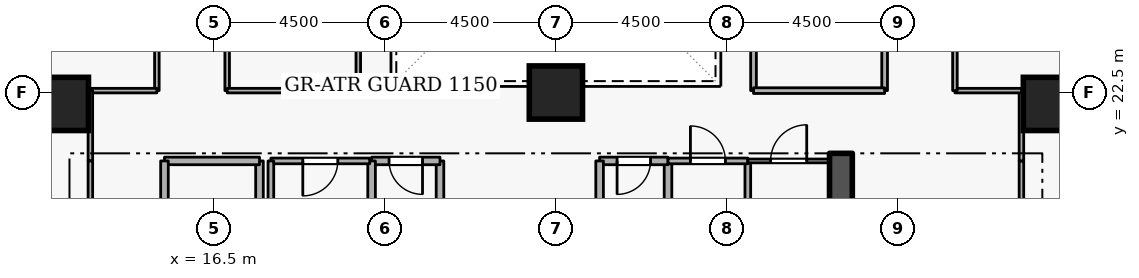
"""IFC4 building model, lengths in metres.
Left out: names, types, materials, properties, quantities, classifications, styles, units other than length and angle.
Written with IfcOpenShell. Run it as: python <this file> out.ifc"""

import sys

from ifc_helpers import new_model, si_unit, direction, frame, frame_2d, origin, origin_2d, place, context, subcontext, project, spatial, rectangle, extrude, element, fill, save


model = new_model("IFC4")
c1 = context("Model", 3, precision=1e-05, world=origin(), true_north=direction((0.0, 1.0)))
c2 = subcontext(c1, "Body", "Model", "MODEL_VIEW")
j1 = project(units=[si_unit("LENGTHUNIT", "METRE"), si_unit("PLANEANGLEUNIT", "RADIAN")], contexts=[c1])
p1 = place(None, origin())
s1 = spatial("IfcSite", under=j1, at=p1, CompositionType="ELEMENT")
p2 = place(p1, origin())
s2 = spatial("IfcBuilding", under=s1, at=p2, CompositionType="ELEMENT")
p3 = place(p2, frame((0.0, 0.0, 64.5)))
s3 = spatial("IfcBuildingStorey", under=s2, at=p3, CompositionType="ELEMENT", Elevation=64.5)
p4 = place(p3, frame((33.0, 15.2, 0.0), z_axis=(0.0, 0.0, 1.0), x_axis=(0.0, 1.0, 0.0)))
e1 = element("IfcWall", 1, at=p4, inside=s3, PredefinedType="SHEAR", context=c2, shape_type="SweptSolid", body=[
    extrude(rectangle(XDim=5.7, YDim=0.6, at=frame_2d((2.85, 0.0))), origin(), (0.0, 0.0, 1.0), 3.6),
])
for number, where, z_axis, x_axis in (
    (2, (12.5, 22.2, 0.0), (0.0, 0.0, 1.0), (1.0, 0.0, 0.0)),
    (3, (38.5, 22.2, 0.0), (0.0, 0.0, 1.0), (1.0, 0.0, 0.0)),
    (4, (25.5, 22.5, 0.0), (0.0, 0.0, 1.0), (1.0, 0.0, 0.0)),
):
    element("IfcColumn", number, at=place(p3, frame(where, z_axis=z_axis, x_axis=x_axis)), inside=s3, PredefinedType="COLUMN", context=c2, shape_type="SweptSolid", body=[
        extrude(rectangle(XDim=1.4, YDim=1.4, at=origin_2d()), origin(), (0.0, 0.0, 1.0), 3.6),
    ])
p5 = place(p3, frame((17.7, 18.4, 0.0), z_axis=(0.0, 0.0, 1.0), x_axis=(0.0, 1.0, 0.0)))
e5 = element("IfcWall", 5, at=p5, inside=s3, PredefinedType="STANDARD", context=c2, shape_type="SweptSolid", body=[
    extrude(rectangle(XDim=2.3, YDim=0.2, at=frame_2d((1.15, 0.0))), origin(), (0.0, 0.0, 1.0), 2.545),
])
p6 = place(p3, frame((17.7, 20.7, 0.0), z_axis=(0.0, 0.0, 1.0), x_axis=(-1.0, 0.0, 0.0)))
e6 = element("IfcWall", 6, at=p6, inside=s3, PredefinedType="STANDARD", context=c2, shape_type="SweptSolid", body=[
    extrude(rectangle(XDim=2.5, YDim=0.2, at=frame_2d((1.25, 0.0))), origin(), (0.0, 0.0, 1.0), 3.34),
])
p7 = place(p3, frame((15.2, 20.7, 0.0), z_axis=(0.0, 0.0, 1.0), x_axis=(0.0, -1.0, 0.0)))
e7 = element("IfcWall", 7, at=p7, inside=s3, PredefinedType="STANDARD", context=c2, shape_type="SweptSolid", body=[
    extrude(rectangle(XDim=5.7, YDim=0.2, at=frame_2d((2.85, 0.0))), origin(), (0.0, 0.0, 1.0), 3.34),
])
p8 = place(p7, frame((2.275, 0.0, 0.0)))
e8 = element("IfcOpeningElement", 8, at=p8, cuts=e7, PredefinedType="OPENING", context=c2, shape_type="SweptSolid", body=[
    extrude(rectangle(XDim=1.15, YDim=2.1, at=frame_2d((0.575, 1.05))), frame((0.0, 0.11, 0.0), z_axis=(0.0, -1.0, 0.0), x_axis=(1.0, 0.0, 0.0)), (0.0, 0.0, 1.0), 0.22),
])
p9 = place(p3, frame((28.45, 18.65, 0.0), z_axis=(0.0, 0.0, 1.0), x_axis=(0.0, 1.0, 0.0)))
e9 = element("IfcWall", 9, at=p9, inside=s3, PredefinedType="STANDARD", context=c2, shape_type="SweptSolid", body=[
    extrude(rectangle(XDim=2.05, YDim=0.2, at=frame_2d((1.025, 0.0))), origin(), (0.0, 0.0, 1.0), 3.34),
])
p10 = place(p3, frame((28.45, 20.7, 0.0), z_axis=(0.0, 0.0, 1.0), x_axis=(-1.0, 0.0, 0.0)))
e10 = element("IfcWall", 10, at=p10, inside=s3, PredefinedType="STANDARD", context=c2, shape_type="SweptSolid", body=[
    extrude(rectangle(XDim=1.8, YDim=0.2, at=frame_2d((0.9, 0.0))), origin(), (0.0, 0.0, 1.0), 3.34),
])
p11 = place(p10, frame((0.46, 0.0, 0.0)))
e11 = element("IfcOpeningElement", 11, at=p11, cuts=e10, PredefinedType="OPENING", context=c2, shape_type="SweptSolid", body=[
    extrude(rectangle(XDim=0.88, YDim=2.04, at=frame_2d((0.44, 1.02))), frame((0.0, 0.11, 0.0), z_axis=(0.0, -1.0, 0.0), x_axis=(1.0, 0.0, 0.0)), (0.0, 0.0, 1.0), 0.22),
])
for number, where, z_axis, x_axis in (
    (12, (26.65, 20.7, 0.0), (0.0, 0.0, 1.0), (0.0, -1.0, 0.0)),
    (13, (22.45, 18.65, 0.0), (0.0, 0.0, 1.0), (0.0, 1.0, 0.0)),
):
    element("IfcWall", number, at=place(p3, frame(where, z_axis=z_axis, x_axis=x_axis)), inside=s3, PredefinedType="STANDARD", context=c2, shape_type="SweptSolid", body=[
        extrude(rectangle(XDim=2.05, YDim=0.2, at=frame_2d((1.025, 0.0))), origin(), (0.0, 0.0, 1.0), 3.34),
    ])
p12 = place(p3, frame((22.45, 20.7, 0.0), z_axis=(0.0, 0.0, 1.0), x_axis=(-1.0, 0.0, 0.0)))
e14 = element("IfcWall", 14, at=p12, inside=s3, PredefinedType="STANDARD", context=c2, shape_type="SweptSolid", body=[
    extrude(rectangle(XDim=1.8, YDim=0.2, at=frame_2d((0.9, 0.0))), origin(), (0.0, 0.0, 1.0), 3.34),
])
p13 = place(p12, frame((0.46, 0.0, 0.0)))
e15 = element("IfcOpeningElement", 15, at=p13, cuts=e14, PredefinedType="OPENING", context=c2, shape_type="SweptSolid", body=[
    extrude(rectangle(XDim=0.88, YDim=2.04, at=frame_2d((0.44, 1.02))), frame((0.0, 0.11, 0.0), z_axis=(0.0, -1.0, 0.0), x_axis=(1.0, 0.0, 0.0)), (0.0, 0.0, 1.0), 0.22),
])
p14 = place(p3, frame((20.65, 20.7, 0.0), z_axis=(0.0, 0.0, 1.0), x_axis=(0.0, -1.0, 0.0)))
e16 = element("IfcWall", 16, at=p14, inside=s3, PredefinedType="STANDARD", context=c2, shape_type="SweptSolid", body=[
    extrude(rectangle(XDim=2.05, YDim=0.2, at=frame_2d((1.025, 0.0))), origin(), (0.0, 0.0, 1.0), 3.34),
])
p15 = place(p3, frame((20.6, 20.7, 0.0), z_axis=(0.0, 0.0, 1.0), x_axis=(-1.0, 0.0, 0.0)))
e17 = element("IfcWall", 17, at=p15, inside=s3, PredefinedType="PARTITIONING", context=c2, shape_type="SweptSolid", body=[
    extrude(rectangle(XDim=2.6, YDim=0.15, at=frame_2d((1.3, 0.0))), origin(), (0.0, 0.0, 1.0), 3.34),
])
p16 = place(p15, frame((0.84, 0.0, 0.0)))
e18 = element("IfcOpeningElement", 18, at=p16, cuts=e17, PredefinedType="OPENING", context=c2, shape_type="SweptSolid", body=[
    extrude(rectangle(XDim=0.92, YDim=2.08, at=frame_2d((0.46, 1.04))), frame((0.0, 0.085, 0.0), z_axis=(0.0, -1.0, 0.0), x_axis=(1.0, 0.0, 0.0)), (0.0, 0.0, 1.0), 0.17),
])
p17 = place(p3, frame((18.0, 20.7, 0.0), z_axis=(0.0, 0.0, 1.0), x_axis=(0.0, -1.0, 0.0)))
e19 = element("IfcWall", 19, at=p17, inside=s3, PredefinedType="PARTITIONING", context=c2, shape_type="SweptSolid", body=[
    extrude(rectangle(XDim=2.05, YDim=0.15, at=frame_2d((1.025, 0.0))), origin(), (0.0, 0.0, 1.0), 2.545),
])
p18 = place(p3, frame((30.55, 20.7, 0.0), z_axis=(0.0, 0.0, 1.0), x_axis=(0.0, -1.0, 0.0)))
e20 = element("IfcWall", 20, at=p18, inside=s3, PredefinedType="PARTITIONING", context=c2, shape_type="SweptSolid", body=[
    extrude(rectangle(XDim=2.05, YDim=0.15, at=frame_2d((1.025, 0.0))), origin(), (0.0, 0.0, 1.0), 3.34),
])
p19 = place(p3, frame((28.45, 20.7, 0.0), z_axis=(0.0, 0.0, 1.0), x_axis=(1.0, 0.0, 0.0)))
e21 = element("IfcWall", 21, at=p19, inside=s3, PredefinedType="PARTITIONING", context=c2, shape_type="SweptSolid", body=[
    extrude(rectangle(XDim=2.1, YDim=0.15, at=frame_2d((1.05, 0.0))), origin(), (0.0, 0.0, 1.0), 3.34),
])
p20 = place(p19, frame((0.59, 0.0, 0.0)))
e22 = element("IfcOpeningElement", 22, at=p20, cuts=e21, PredefinedType="OPENING", context=c2, shape_type="SweptSolid", body=[
    extrude(rectangle(XDim=0.92, YDim=2.08, at=frame_2d((0.46, 1.04))), frame((0.0, 0.085, 0.0), z_axis=(0.0, -1.0, 0.0), x_axis=(1.0, 0.0, 0.0)), (0.0, 0.0, 1.0), 0.17),
])
p21 = place(p3, frame((30.55, 20.7, 0.0), z_axis=(0.0, 0.0, 1.0), x_axis=(1.0, 0.0, 0.0)))
e23 = element("IfcWall", 23, at=p21, inside=s3, PredefinedType="PARTITIONING", context=c2, shape_type="SweptSolid", body=[
    extrude(rectangle(XDim=2.15, YDim=0.1, at=frame_2d((1.075, 0.0))), origin(), (0.0, 0.0, 1.0), 3.34),
])
p22 = place(p21, frame((0.6, 0.0, 0.0)))
e24 = element("IfcOpeningElement", 24, at=p22, cuts=e23, PredefinedType="OPENING", context=c2, shape_type="SweptSolid", body=[
    extrude(rectangle(XDim=0.95, YDim=2.1, at=frame_2d((0.475, 1.05))), frame((0.0, 0.06, 0.0), z_axis=(0.0, -1.0, 0.0), x_axis=(1.0, 0.0, 0.0)), (0.0, 0.0, 1.0), 0.12),
])
p23 = place(p3, frame((15.0, 27.0, 0.0), z_axis=(0.0, 0.0, 1.0), x_axis=(0.0, -1.0, 0.0)))
e25 = element("IfcWall", 25, at=p23, inside=s3, PredefinedType="PARTITIONING", context=c2, shape_type="SweptSolid", body=[
    extrude(rectangle(XDim=4.45, YDim=0.12, at=frame_2d((2.225, 0.0))), origin(), (0.0, 0.0, 1.0), 3.34),
])
p24 = place(p3, frame((15.0, 22.55, 0.0), z_axis=(0.0, 0.0, 1.0), x_axis=(-1.0, 0.0, 0.0)))
e26 = element("IfcWall", 26, at=p24, inside=s3, PredefinedType="PARTITIONING", context=c2, shape_type="SweptSolid", body=[
    extrude(rectangle(XDim=1.75, YDim=0.12, at=frame_2d((0.875, 0.0))), origin(), (0.0, 0.0, 1.0), 3.34),
])
p25 = place(p3, frame((13.25, 22.55, 0.0), z_axis=(0.0, 0.0, 1.0), x_axis=(0.0, -1.0, 0.0)))
e27 = element("IfcWall", 27, at=p25, inside=s3, PredefinedType="PARTITIONING", context=c2, shape_type="SweptSolid", body=[
    extrude(rectangle(XDim=1.85, YDim=0.12, at=frame_2d((0.925, 0.0))), origin(), (0.0, 0.0, 1.0), 3.34),
])
p26 = place(p3, frame((13.25, 20.7, 0.0), z_axis=(0.0, 0.0, 1.0), x_axis=(0.0, -1.0, 0.0)))
e28 = element("IfcWall", 28, at=p26, inside=s3, PredefinedType="PARTITIONING", context=c2, shape_type="SweptSolid", body=[
    extrude(rectangle(XDim=9.35, YDim=0.12, at=frame_2d((4.675, 0.0))), origin(), (0.0, 0.0, 1.0), 3.34),
])
p27 = place(p26, frame((4.15, 0.0, 0.0)))
e29 = element("IfcOpeningElement", 29, at=p27, cuts=e28, PredefinedType="OPENING", context=c2, shape_type="SweptSolid", body=[
    extrude(rectangle(XDim=1.05, YDim=2.1, at=frame_2d((0.525, 1.05))), frame((0.0, 0.07, 0.0), z_axis=(0.0, -1.0, 0.0), x_axis=(1.0, 0.0, 0.0)), (0.0, 0.0, 1.0), 0.14),
])
p28 = place(p3, frame((37.75, 17.55, 0.0), z_axis=(0.0, 0.0, 1.0), x_axis=(0.0, 1.0, 0.0)))
e30 = element("IfcWall", 30, at=p28, inside=s3, PredefinedType="PARTITIONING", context=c2, shape_type="SweptSolid", body=[
    extrude(rectangle(XDim=3.15, YDim=0.12, at=frame_2d((1.575, 0.0))), origin(), (0.0, 0.0, 1.0), 3.34),
])
p29 = place(p3, frame((37.75, 20.7, 0.0), z_axis=(0.0, 0.0, 1.0), x_axis=(0.0, 1.0, 0.0)))
e31 = element("IfcWall", 31, at=p29, inside=s3, PredefinedType="PARTITIONING", context=c2, shape_type="SweptSolid", body=[
    extrude(rectangle(XDim=1.85, YDim=0.12, at=frame_2d((0.925, 0.0))), origin(), (0.0, 0.0, 1.0), 3.34),
])
p30 = place(p3, frame((37.75, 22.55, 0.0), z_axis=(0.0, 0.0, 1.0), x_axis=(-1.0, 0.0, 0.0)))
e32 = element("IfcWall", 32, at=p30, inside=s3, PredefinedType="PARTITIONING", context=c2, shape_type="SweptSolid", body=[
    extrude(rectangle(XDim=1.75, YDim=0.12, at=frame_2d((0.875, 0.0))), origin(), (0.0, 0.0, 1.0), 3.34),
])
p31 = place(p3, frame((36.0, 22.55, 0.0), z_axis=(0.0, 0.0, 1.0), x_axis=(0.0, 1.0, 0.0)))
e33 = element("IfcWall", 33, at=p31, inside=s3, PredefinedType="PARTITIONING", context=c2, shape_type="SweptSolid", body=[
    extrude(rectangle(XDim=4.45, YDim=0.12, at=frame_2d((2.225, 0.0))), origin(), (0.0, 0.0, 1.0), 3.34),
])
p32 = place(p31, frame((1.7, 0.0, 0.0)))
e34 = element("IfcOpeningElement", 34, at=p32, cuts=e33, PredefinedType="OPENING", context=c2, shape_type="SweptSolid", body=[
    extrude(rectangle(XDim=1.05, YDim=2.1, at=frame_2d((0.525, 1.05))), frame((0.0, 0.07, 0.0), z_axis=(0.0, -1.0, 0.0), x_axis=(1.0, 0.0, 0.0)), (0.0, 0.0, 1.0), 0.14),
])
p33 = place(p3, frame((30.7, 22.55, 0.0), z_axis=(0.0, 0.0, 1.0), x_axis=(0.0, 1.0, 0.0)))
e35 = element("IfcWall", 35, at=p33, inside=s3, PredefinedType="PARTITIONING", context=c2, shape_type="SweptSolid", body=[
    extrude(rectangle(XDim=8.9, YDim=0.15, at=frame_2d((4.45, 0.0))), origin(), (0.0, 0.0, 1.0), 3.34),
])
p34 = place(p3, frame((34.15, 31.45, 0.0), z_axis=(0.0, 0.0, 1.0), x_axis=(0.0, -1.0, 0.0)))
e36 = element("IfcWall", 36, at=p34, inside=s3, PredefinedType="PARTITIONING", context=c2, shape_type="SweptSolid", body=[
    extrude(rectangle(XDim=8.9, YDim=0.15, at=frame_2d((4.45, 0.0))), origin(), (0.0, 0.0, 1.0), 3.34),
])
p35 = place(p34, frame((3.8, 0.0, 0.0)))
e37 = element("IfcOpeningElement", 37, at=p35, cuts=e36, PredefinedType="OPENING", context=c2, shape_type="SweptSolid", body=[
    extrude(rectangle(XDim=1.3, YDim=2.12, at=frame_2d((0.65, 1.06))), frame((0.0, 0.085, 0.0), z_axis=(0.0, -1.0, 0.0), x_axis=(1.0, 0.0, 0.0)), (0.0, 0.0, 1.0), 0.17),
])
p36 = place(p3, frame((34.15, 22.55, 0.0), z_axis=(0.0, 0.0, 1.0), x_axis=(-1.0, 0.0, 0.0)))
e38 = element("IfcWall", 38, at=p36, inside=s3, PredefinedType="PARTITIONING", context=c2, shape_type="SweptSolid", body=[
    extrude(rectangle(XDim=3.45, YDim=0.15, at=frame_2d((1.725, 0.0))), origin(), (0.0, 0.0, 1.0), 3.34),
])
p37 = place(p3, frame((16.85, 22.55, 0.0), z_axis=(0.0, 0.0, 1.0), x_axis=(0.0, 1.0, 0.0)))
e39 = element("IfcWall", 39, at=p37, inside=s3, PredefinedType="PARTITIONING", context=c2, shape_type="SweptSolid", body=[
    extrude(rectangle(XDim=8.9, YDim=0.12, at=frame_2d((4.45, 0.0))), origin(), (0.0, 0.0, 1.0), 3.34),
])
p38 = place(p37, frame((3.975, 0.0, 0.0)))
e40 = element("IfcOpeningElement", 40, at=p38, cuts=e39, PredefinedType="OPENING", context=c2, shape_type="SweptSolid", body=[
    extrude(rectangle(XDim=0.95, YDim=2.1, at=frame_2d((0.475, 1.05))), frame((0.0, 0.07, 0.0), z_axis=(0.0, -1.0, 0.0), x_axis=(1.0, 0.0, 0.0)), (0.0, 0.0, 1.0), 0.14),
])
p39 = place(p3, frame((20.3, 31.45, 0.0), z_axis=(0.0, 0.0, 1.0), x_axis=(0.0, -1.0, 0.0)))
e41 = element("IfcWall", 41, at=p39, inside=s3, PredefinedType="PARTITIONING", context=c2, shape_type="SweptSolid", body=[
    extrude(rectangle(XDim=8.9, YDim=0.12, at=frame_2d((4.45, 0.0))), origin(), (0.0, 0.0, 1.0), 3.34),
])
p40 = place(p3, frame((20.3, 22.55, 0.0), z_axis=(0.0, 0.0, 1.0), x_axis=(-1.0, 0.0, 0.0)))
e42 = element("IfcWall", 42, at=p40, inside=s3, PredefinedType="PARTITIONING", context=c2, shape_type="SweptSolid", body=[
    extrude(rectangle(XDim=3.45, YDim=0.12, at=frame_2d((1.725, 0.0))), origin(), (0.0, 0.0, 1.0), 3.34),
])
p41 = place(p11, origin())
e43 = element("IfcDoor", 43, at=p41, inside=s3, OperationType="SINGLE_SWING_RIGHT", PredefinedType="DOOR", context=c2, shape_type="SweptSolid", body=[
    extrude(rectangle(XDim=0.88, YDim=2.04, at=frame_2d((0.44, 1.02))), frame((0.0, 0.025, 0.0), z_axis=(0.0, -1.0, 0.0), x_axis=(1.0, 0.0, 0.0)), (0.0, 0.0, 1.0), 0.05),
])
fill(e11, e43)
p42 = place(p13, origin())
e44 = element("IfcDoor", 44, at=p42, inside=s3, OperationType="SINGLE_SWING_LEFT", PredefinedType="DOOR", context=c2, shape_type="SweptSolid", body=[
    extrude(rectangle(XDim=0.88, YDim=2.04, at=frame_2d((0.44, 1.02))), frame((0.0, 0.025, 0.0), z_axis=(0.0, -1.0, 0.0), x_axis=(1.0, 0.0, 0.0)), (0.0, 0.0, 1.0), 0.05),
])
fill(e15, e44)
p43 = place(p16, origin())
e45 = element("IfcDoor", 45, at=p43, inside=s3, OperationType="SINGLE_SWING_RIGHT", PredefinedType="DOOR", context=c2, shape_type="SweptSolid", body=[
    extrude(rectangle(XDim=0.92, YDim=2.08, at=frame_2d((0.46, 1.04))), frame((0.0, 0.025, 0.0), z_axis=(0.0, -1.0, 0.0), x_axis=(1.0, 0.0, 0.0)), (0.0, 0.0, 1.0), 0.05),
])
fill(e18, e45)
p44 = place(p20, origin())
e46 = element("IfcDoor", 46, at=p44, inside=s3, OperationType="SINGLE_SWING_LEFT", PredefinedType="DOOR", context=c2, shape_type="SweptSolid", body=[
    extrude(rectangle(XDim=0.92, YDim=2.08, at=frame_2d((0.46, 1.04))), frame((0.0, 0.025, 0.0), z_axis=(0.0, -1.0, 0.0), x_axis=(1.0, 0.0, 0.0)), (0.0, 0.0, 1.0), 0.05),
])
fill(e22, e46)
p45 = place(p22, origin())
e47 = element("IfcDoor", 47, at=p45, inside=s3, OperationType="SINGLE_SWING_RIGHT", PredefinedType="DOOR", context=c2, shape_type="SweptSolid", body=[
    extrude(rectangle(XDim=0.95, YDim=2.1, at=frame_2d((0.475, 1.05))), frame((0.0, 0.025, 0.0), z_axis=(0.0, -1.0, 0.0), x_axis=(1.0, 0.0, 0.0)), (0.0, 0.0, 1.0), 0.05),
])
fill(e24, e47)
save(model, sys.argv[1])
